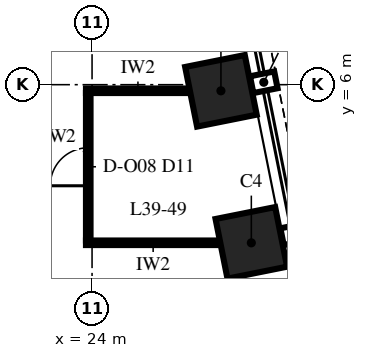
"""IFC4 building model, lengths in metres.
Left out: names, types, materials, properties, quantities, classifications, styles, units other than length and angle.
Written with IfcOpenShell. Run it as: python <this file> out.ifc"""

import sys

from ifc_helpers import new_model, si_unit, direction, frame, frame_2d, origin, origin_2d, place, context, subcontext, project, spatial, rectangle, extrude, element, fill, save


model = new_model("IFC4")
c1 = context("Model", 3, precision=1e-05, world=origin(), true_north=direction((0.0, 1.0)))
c2 = subcontext(c1, "Body", "Model", "MODEL_VIEW")
j1 = project(units=[si_unit("LENGTHUNIT", "METRE"), si_unit("PLANEANGLEUNIT", "RADIAN")], contexts=[c1])
p1 = place(None, origin())
s1 = spatial("IfcSite", under=j1, at=p1, CompositionType="ELEMENT")
p2 = place(p1, origin())
s2 = spatial("IfcBuilding", under=s1, at=p2, CompositionType="ELEMENT")
p3 = place(p2, frame((0.0, 0.0, 173.0)))
s3 = spatial("IfcBuildingStorey", under=s2, at=p3, CompositionType="ELEMENT", Elevation=173.0)
for number, where, z_axis, x_axis in (
    (1, (28.191, 1.838, 0.0), (0.0, 0.0, 1.0), (-0.196, 0.981, 0.0)),
    (2, (27.391, 5.838, 0.0), (0.0, 0.0, 1.0), (-0.196, 0.981, 0.0)),
):
    element("IfcColumn", number, at=place(p3, frame(where, z_axis=z_axis, x_axis=x_axis)), inside=s3, PredefinedType="COLUMN", context=c2, shape_type="SweptSolid", body=[
        extrude(rectangle(XDim=1.6, YDim=1.6, at=origin_2d()), origin(), (0.0, 0.0, 1.0), 5.0),
    ])
p4 = place(p3, frame((23.84, 1.84, 0.0), z_axis=(0.0, 0.0, 1.0), x_axis=(1.0, 0.0, 0.0)))
e3 = element("IfcWall", 3, at=p4, inside=s3, PredefinedType="PARTITIONING", context=c2, shape_type="SweptSolid", body=[
    extrude(rectangle(XDim=3.535, YDim=0.12, at=frame_2d((1.767, 0.0))), origin(), (0.0, 0.0, 1.0), 4.25),
])
p5 = place(p3, frame((23.84, 5.84, 0.0), z_axis=(0.0, 0.0, 1.0), x_axis=(1.0, 0.0, 0.0)))
e4 = element("IfcWall", 4, at=p5, inside=s3, PredefinedType="PARTITIONING", context=c2, shape_type="SweptSolid", body=[
    extrude(rectangle(XDim=2.735, YDim=0.12, at=frame_2d((1.367, 0.0))), origin(), (0.0, 0.0, 1.0), 3.842),
])
p6 = place(p3, frame((23.9, 1.9, 0.0), z_axis=(0.0, 0.0, 1.0), x_axis=(0.0, 1.0, 0.0)))
e5 = element("IfcWall", 5, at=p6, inside=s3, PredefinedType="PARTITIONING", context=c2, shape_type="SweptSolid", body=[
    extrude(rectangle(XDim=3.88, YDim=0.12, at=frame_2d((1.94, 0.0))), origin(), (0.0, 0.0, 1.0), 4.85),
])
p7 = place(p6, frame((1.44, 0.0, 0.0)))
e6 = element("IfcOpeningElement", 6, at=p7, cuts=e5, PredefinedType="OPENING", context=c2, shape_type="SweptSolid", body=[
    extrude(rectangle(XDim=1.0, YDim=2.4, at=frame_2d((0.5, 1.2))), frame((0.0, 0.075, 0.0), z_axis=(0.0, -1.0, 0.0), x_axis=(1.0, 0.0, 0.0)), (0.0, 0.0, 1.0), 0.15),
])
p8 = place(p7, origin())
e7 = element("IfcDoor", 7, at=p8, inside=s3, OperationType="SINGLE_SWING_RIGHT", PredefinedType="DOOR", context=c2, shape_type="SweptSolid", body=[
    extrude(rectangle(XDim=1.0, YDim=2.4, at=frame_2d((0.5, 1.2))), frame((0.0, 0.06, 0.0), z_axis=(0.0, -1.0, 0.0), x_axis=(1.0, 0.0, 0.0)), (0.0, 0.0, 1.0), 0.12),
])
fill(e6, e7)
save(model, sys.argv[1])
